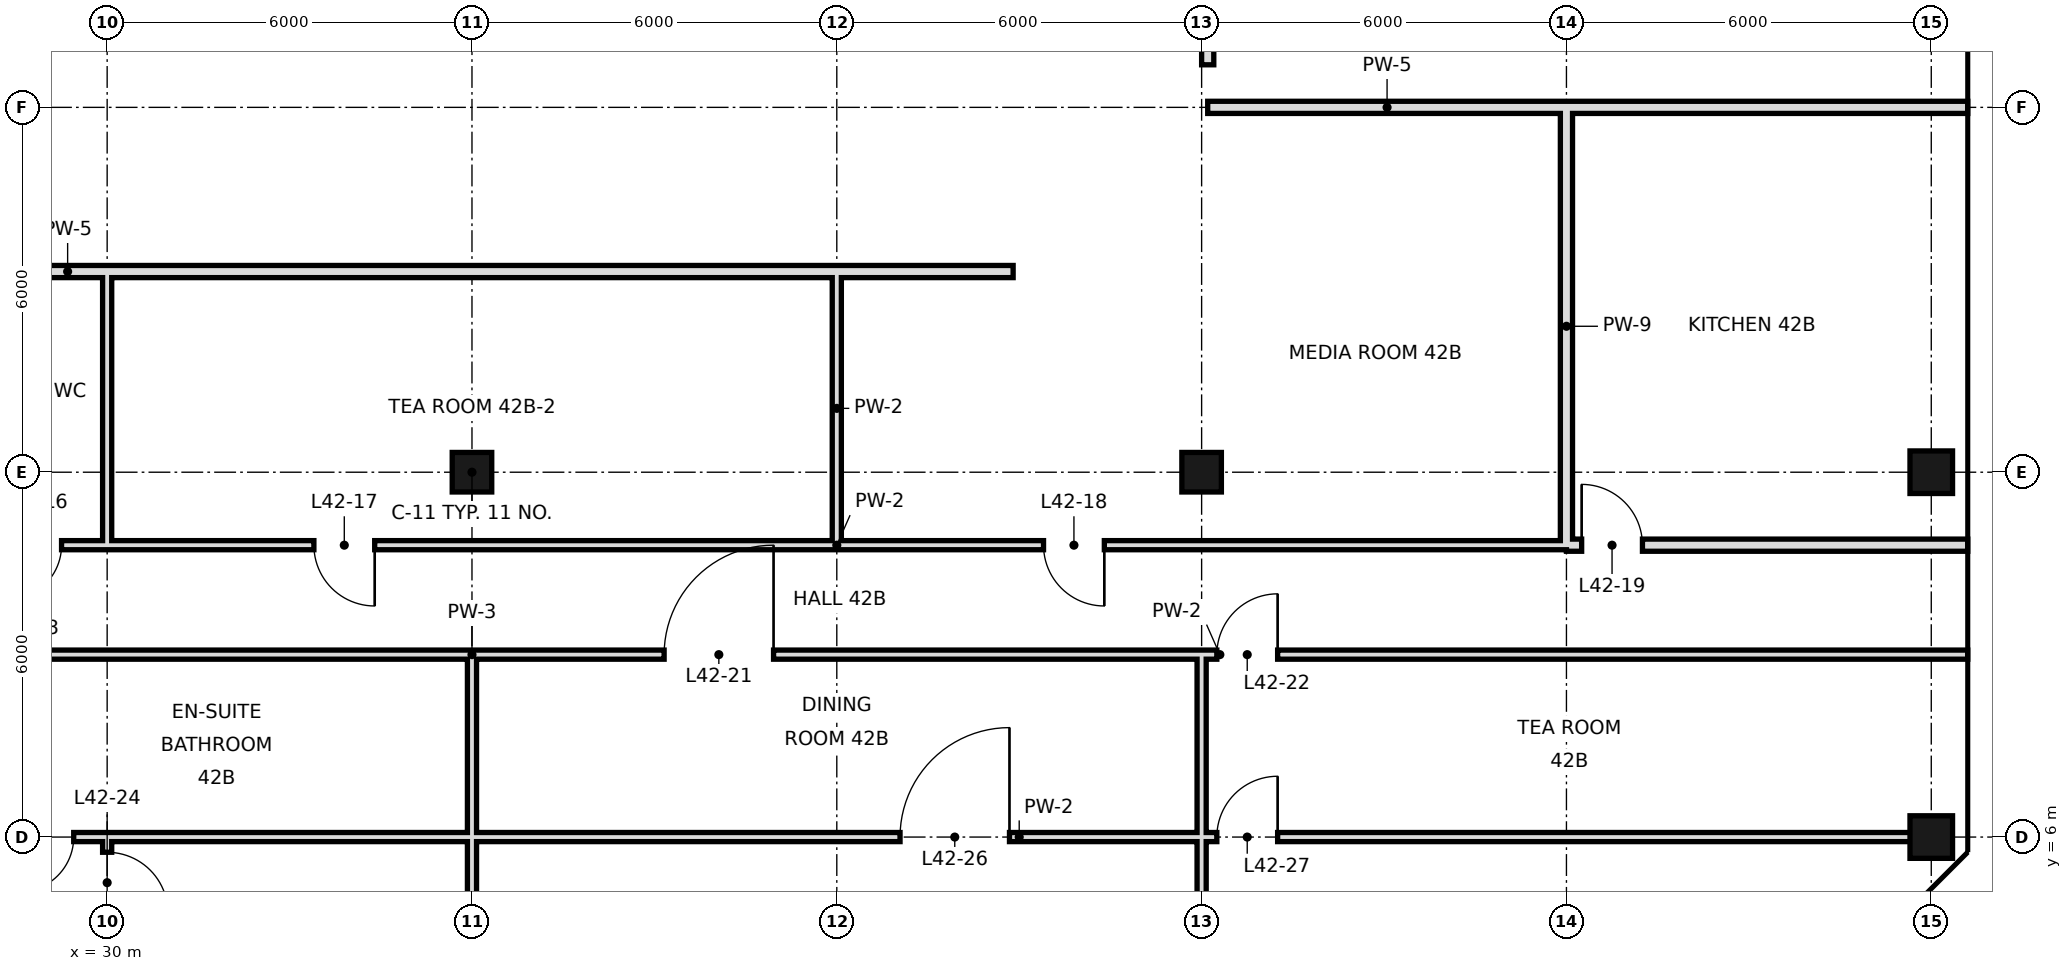
"""IFC4 building model, lengths in metres.
Left out: names, types, materials, properties, quantities, classifications, styles, units other than length and angle.
Written with IfcOpenShell. Run it as: python <this file> out.ifc"""

import sys

from ifc_helpers import new_model, si_unit, direction, frame, frame_2d, origin, origin_2d, place, context, subcontext, project, spatial, rectangle, hollow_rectangle, extrude, element, fill, save


model = new_model("IFC4")
c1 = context("Model", 3, precision=1e-05, world=origin(), true_north=direction((0.0, 1.0)))
c2 = subcontext(c1, "Body", "Model", "MODEL_VIEW")
j1 = project(units=[si_unit("LENGTHUNIT", "METRE"), si_unit("PLANEANGLEUNIT", "RADIAN")], contexts=[c1])
p1 = place(None, origin())
s1 = spatial("IfcSite", under=j1, at=p1, CompositionType="ELEMENT")
p2 = place(p1, origin())
s2 = spatial("IfcBuilding", under=s1, at=p2, CompositionType="ELEMENT")
p3 = place(p2, frame((0.0, 0.0, 181.6)))
s3 = spatial("IfcBuildingStorey", under=s2, at=p3, CompositionType="ELEMENT", Elevation=181.6)
for number, where, z_axis, x_axis in (
    (1, (36.0, 12.0, 0.0), (0.0, 0.0, 1.0), (1.0, 0.0, 0.0)),
    (2, (48.0, 12.0, 0.0), (0.0, 0.0, 1.0), (1.0, 0.0, 0.0)),
):
    element("IfcColumn", number, at=place(p3, frame(where, z_axis=z_axis, x_axis=x_axis)), inside=s3, PredefinedType="COLUMN", context=c2, shape_type="SweptSolid", body=[
        extrude(hollow_rectangle(XDim=0.65, YDim=0.65, WallThickness=0.032, at=origin_2d()), origin(), (0.0, 0.0, 1.0), 4.4),
    ])
for number, where, z_axis, x_axis in (
    (3, (60.0, 6.0, 0.0), (0.0, 0.0, 1.0), (1.0, 0.0, 0.0)),
    (4, (60.0, 12.0, 0.0), (0.0, 0.0, 1.0), (1.0, 0.0, 0.0)),
):
    element("IfcColumn", number, at=place(p3, frame(where, z_axis=z_axis, x_axis=x_axis)), inside=s3, PredefinedType="COLUMN", context=c2, shape_type="SweptSolid", body=[
        extrude(hollow_rectangle(XDim=0.7, YDim=0.7, WallThickness=0.036, at=origin_2d()), origin(), (0.0, 0.0, 1.0), 4.4),
    ])
p4 = place(p3, frame((30.0, -0.6, 0.0), z_axis=(0.0, 0.0, 1.0), x_axis=(0.0, 1.0, 0.0)))
e5 = element("IfcWall", 5, at=p4, inside=s3, PredefinedType="PARTITIONING", context=c2, shape_type="SweptSolid", body=[
    extrude(rectangle(XDim=6.6, YDim=0.15, at=frame_2d((3.3, 0.0))), origin(), (0.0, 0.0, 1.0), 3.4),
])
p5 = place(p4, frame((5.35, 0.0, 0.0)))
e6 = element("IfcOpeningElement", 6, at=p5, cuts=e5, PredefinedType="OPENING", context=c2, shape_type="SweptSolid", body=[
    extrude(rectangle(XDim=1.0, YDim=2.4, at=frame_2d((0.5, 1.2))), frame((0.0, 0.085, 0.0), z_axis=(0.0, -1.0, 0.0), x_axis=(1.0, 0.0, 0.0)), (0.0, 0.0, 1.0), 0.17),
])
p6 = place(p3, frame((30.0, 10.8, 0.0), z_axis=(0.0, 0.0, 1.0), x_axis=(0.0, 1.0, 0.0)))
e7 = element("IfcWall", 7, at=p6, inside=s3, PredefinedType="PARTITIONING", context=c2, shape_type="SweptSolid", body=[
    extrude(rectangle(XDim=4.5, YDim=0.15, at=frame_2d((2.25, 0.0))), origin(), (0.0, 0.0, 1.0), 3.4),
])
p7 = place(p3, frame((36.0, 0.0, 0.0), z_axis=(0.0, 0.0, 1.0), x_axis=(0.0, 1.0, 0.0)))
e8 = element("IfcWall", 8, at=p7, inside=s3, PredefinedType="PARTITIONING", context=c2, shape_type="SweptSolid", body=[
    extrude(rectangle(XDim=6.0, YDim=0.15, at=frame_2d((3.0, 0.0))), origin(), (0.0, 0.0, 1.0), 3.4),
])
p8 = place(p3, frame((36.0, 6.0, 0.0), z_axis=(0.0, 0.0, 1.0), x_axis=(0.0, 1.0, 0.0)))
e9 = element("IfcWall", 9, at=p8, inside=s3, PredefinedType="PARTITIONING", context=c2, shape_type="SweptSolid", body=[
    extrude(rectangle(XDim=3.0, YDim=0.15, at=frame_2d((1.5, 0.0))), origin(), (0.0, 0.0, 1.0), 3.4),
])
p9 = place(p3, frame((42.0, 10.8, 0.0), z_axis=(0.0, 0.0, 1.0), x_axis=(0.0, 1.0, 0.0)))
e10 = element("IfcWall", 10, at=p9, inside=s3, PredefinedType="PARTITIONING", context=c2, shape_type="SweptSolid", body=[
    extrude(rectangle(XDim=4.5, YDim=0.15, at=frame_2d((2.25, 0.0))), origin(), (0.0, 0.0, 1.0), 3.4),
])
p10 = place(p3, frame((48.0, 0.0, 0.0), z_axis=(0.0, 0.0, 1.0), x_axis=(0.0, 1.0, 0.0)))
e11 = element("IfcWall", 11, at=p10, inside=s3, PredefinedType="PARTITIONING", context=c2, shape_type="SweptSolid", body=[
    extrude(rectangle(XDim=9.0, YDim=0.15, at=frame_2d((4.5, 0.0))), origin(), (0.0, 0.0, 1.0), 3.4),
])
p11 = place(p3, frame((48.1, 18.7, 0.0), z_axis=(0.0, 0.0, 1.0), x_axis=(0.0, 1.0, 0.0)))
e12 = element("IfcWall", 12, at=p11, inside=s3, PredefinedType="SOLIDWALL", context=c2, shape_type="SweptSolid", body=[
    extrude(rectangle(XDim=29.3, YDim=0.2, at=frame_2d((14.65, 0.0))), origin(), (0.0, 0.0, 1.0), 3.4),
])
p12 = place(p11, frame((14.05, 0.0, 0.0)))
e13 = element("IfcOpeningElement", 13, at=p12, cuts=e12, PredefinedType="OPENING", context=c2, shape_type="SweptSolid", body=[
    extrude(rectangle(XDim=1.2, YDim=2.4, at=frame_2d((0.6, 1.2))), frame((0.0, 0.11, 0.0), z_axis=(0.0, -1.0, 0.0), x_axis=(1.0, 0.0, 0.0)), (0.0, 0.0, 1.0), 0.22),
])
p13 = place(p3, frame((54.0, 10.8, 0.0), z_axis=(0.0, 0.0, 1.0), x_axis=(0.0, 1.0, 0.0)))
e14 = element("IfcWall", 14, at=p13, inside=s3, PredefinedType="SOLIDWALL", context=c2, shape_type="SweptSolid", body=[
    extrude(rectangle(XDim=7.2, YDim=0.2, at=frame_2d((3.6, 0.0))), origin(), (0.0, 0.0, 1.0), 3.4),
])
p14 = place(p3, frame((54.0, 10.8, 0.0), z_axis=(0.0, 0.0, 1.0), x_axis=(1.0, 0.0, 0.0)))
e15 = element("IfcWall", 15, at=p14, inside=s3, PredefinedType="SOLIDWALL", context=c2, shape_type="SweptSolid", body=[
    extrude(rectangle(XDim=6.6, YDim=0.2, at=frame_2d((3.3, 0.0))), origin(), (0.0, 0.0, 1.0), 3.65),
])
p15 = place(p14, frame((0.25, 0.0, 0.0)))
e16 = element("IfcOpeningElement", 16, at=p15, cuts=e15, PredefinedType="OPENING", context=c2, shape_type="SweptSolid", body=[
    extrude(rectangle(XDim=1.0, YDim=2.4, at=frame_2d((0.5, 1.2))), frame((0.0, 0.11, 0.0), z_axis=(0.0, -1.0, 0.0), x_axis=(1.0, 0.0, 0.0)), (0.0, 0.0, 1.0), 0.22),
])
p16 = place(p3, frame((30.0, 10.8, 0.0), z_axis=(0.0, 0.0, 1.0), x_axis=(1.0, 0.0, 0.0)))
e17 = element("IfcWall", 17, at=p16, inside=s3, PredefinedType="PARTITIONING", context=c2, shape_type="SweptSolid", body=[
    extrude(rectangle(XDim=24.0, YDim=0.15, at=frame_2d((12.0, 0.0))), origin(), (0.0, 0.0, 1.0), 4.1),
])
p17 = place(p16, frame((3.4, 0.0, 0.0)))
e18 = element("IfcOpeningElement", 18, at=p17, cuts=e17, PredefinedType="OPENING", context=c2, shape_type="SweptSolid", body=[
    extrude(rectangle(XDim=1.0, YDim=2.4, at=frame_2d((0.5, 1.2))), frame((0.0, 0.085, 0.0), z_axis=(0.0, -1.0, 0.0), x_axis=(1.0, 0.0, 0.0)), (0.0, 0.0, 1.0), 0.17),
])
p18 = place(p16, frame((15.4, 0.0, 0.0)))
e19 = element("IfcOpeningElement", 19, at=p18, cuts=e17, PredefinedType="OPENING", context=c2, shape_type="SweptSolid", body=[
    extrude(rectangle(XDim=1.0, YDim=2.4, at=frame_2d((0.5, 1.2))), frame((0.0, 0.085, 0.0), z_axis=(0.0, -1.0, 0.0), x_axis=(1.0, 0.0, 0.0)), (0.0, 0.0, 1.0), 0.17),
])
p19 = place(p3, frame((27.6, 10.8, 0.0), z_axis=(0.0, 0.0, 1.0), x_axis=(1.0, 0.0, 0.0)))
e20 = element("IfcWall", 20, at=p19, inside=s3, PredefinedType="PARTITIONING", context=c2, shape_type="SweptSolid", body=[
    extrude(rectangle(XDim=2.4, YDim=0.15, at=frame_2d((1.2, 0.0))), origin(), (0.0, 0.0, 1.0), 4.1),
])
p20 = place(p19, frame((0.75, 0.0, 0.0)))
e21 = element("IfcOpeningElement", 21, at=p20, cuts=e20, PredefinedType="OPENING", context=c2, shape_type="SweptSolid", body=[
    extrude(rectangle(XDim=0.9, YDim=2.4, at=frame_2d((0.45, 1.2))), frame((0.0, 0.085, 0.0), z_axis=(0.0, -1.0, 0.0), x_axis=(1.0, 0.0, 0.0)), (0.0, 0.0, 1.0), 0.17),
])
p21 = place(p3, frame((13.8, 15.3, 0.0), z_axis=(0.0, 0.0, 1.0), x_axis=(1.0, 0.0, 0.0)))
e22 = element("IfcWall", 22, at=p21, inside=s3, PredefinedType="SOLIDWALL", context=c2, shape_type="SweptSolid", body=[
    extrude(rectangle(XDim=31.1, YDim=0.2, at=frame_2d((15.55, 0.0))), origin(), (0.0, 0.0, 1.0), 3.4),
])
p22 = place(p21, frame((11.02, 0.0, 0.0)))
e23 = element("IfcOpeningElement", 23, at=p22, cuts=e22, PredefinedType="OPENING", context=c2, shape_type="SweptSolid", body=[
    extrude(rectangle(XDim=1.2, YDim=2.4, at=frame_2d((0.6, 1.2))), frame((0.0, 0.11, 0.0), z_axis=(0.0, -1.0, 0.0), x_axis=(1.0, 0.0, 0.0)), (0.0, 0.0, 1.0), 0.22),
])
p23 = place(p3, frame((48.1, 18.0, 0.0), z_axis=(0.0, 0.0, 1.0), x_axis=(1.0, 0.0, 0.0)))
e24 = element("IfcWall", 24, at=p23, inside=s3, PredefinedType="SOLIDWALL", context=c2, shape_type="SweptSolid", body=[
    extrude(rectangle(XDim=5.9, YDim=0.2, at=frame_2d((2.95, 0.0))), origin(), (0.0, 0.0, 1.0), 3.4),
])
p24 = place(p3, frame((54.0, 18.0, 0.0), z_axis=(0.0, 0.0, 1.0), x_axis=(1.0, 0.0, 0.0)))
e25 = element("IfcWall", 25, at=p24, inside=s3, PredefinedType="SOLIDWALL", context=c2, shape_type="SweptSolid", body=[
    extrude(rectangle(XDim=6.6, YDim=0.2, at=frame_2d((3.3, 0.0))), origin(), (0.0, 0.0, 1.0), 3.4),
])
p25 = place(p3, frame((36.0, 6.0, 0.0), z_axis=(0.0, 0.0, 1.0), x_axis=(1.0, 0.0, 0.0)))
e26 = element("IfcWall", 26, at=p25, inside=s3, PredefinedType="PARTITIONING", context=c2, shape_type="SweptSolid", body=[
    extrude(rectangle(XDim=24.0, YDim=0.15, at=frame_2d((12.0, 0.0))), origin(), (0.0, 0.0, 1.0), 3.4),
])
p26 = place(p25, frame((7.04, 0.0, 0.0)))
e27 = element("IfcOpeningElement", 27, at=p26, cuts=e26, PredefinedType="OPENING", context=c2, shape_type="SweptSolid", body=[
    extrude(rectangle(XDim=1.8, YDim=2.4, at=frame_2d((0.9, 1.2))), frame((0.0, 0.085, 0.0), z_axis=(0.0, -1.0, 0.0), x_axis=(1.0, 0.0, 0.0)), (0.0, 0.0, 1.0), 0.17),
])
p27 = place(p25, frame((12.25, 0.0, 0.0)))
e28 = element("IfcOpeningElement", 28, at=p27, cuts=e26, PredefinedType="OPENING", context=c2, shape_type="SweptSolid", body=[
    extrude(rectangle(XDim=1.0, YDim=2.4, at=frame_2d((0.5, 1.2))), frame((0.0, 0.085, 0.0), z_axis=(0.0, -1.0, 0.0), x_axis=(1.0, 0.0, 0.0)), (0.0, 0.0, 1.0), 0.17),
])
p28 = place(p3, frame((27.6, 6.0, 0.0), z_axis=(0.0, 0.0, 1.0), x_axis=(1.0, 0.0, 0.0)))
e29 = element("IfcWall", 29, at=p28, inside=s3, PredefinedType="PARTITIONING", context=c2, shape_type="SweptSolid", body=[
    extrude(rectangle(XDim=8.4, YDim=0.15, at=frame_2d((4.2, 0.0))), origin(), (0.0, 0.0, 1.0), 3.65),
])
p29 = place(p28, frame((0.95, 0.0, 0.0)))
e30 = element("IfcOpeningElement", 30, at=p29, cuts=e29, PredefinedType="OPENING", context=c2, shape_type="SweptSolid", body=[
    extrude(rectangle(XDim=0.9, YDim=2.4, at=frame_2d((0.45, 1.2))), frame((0.0, 0.085, 0.0), z_axis=(0.0, -1.0, 0.0), x_axis=(1.0, 0.0, 0.0)), (0.0, 0.0, 1.0), 0.17),
])
p30 = place(p3, frame((36.0, 9.0, 0.0), z_axis=(0.0, 0.0, 1.0), x_axis=(1.0, 0.0, 0.0)))
e31 = element("IfcWall", 31, at=p30, inside=s3, PredefinedType="PARTITIONING", context=c2, shape_type="SweptSolid", body=[
    extrude(rectangle(XDim=24.6, YDim=0.15, at=frame_2d((12.3, 0.0))), origin(), (0.0, 0.0, 1.0), 4.1),
])
p31 = place(p30, frame((3.16, 0.0, 0.0)))
e32 = element("IfcOpeningElement", 32, at=p31, cuts=e31, PredefinedType="OPENING", context=c2, shape_type="SweptSolid", body=[
    extrude(rectangle(XDim=1.8, YDim=2.4, at=frame_2d((0.9, 1.2))), frame((0.0, 0.085, 0.0), z_axis=(0.0, -1.0, 0.0), x_axis=(1.0, 0.0, 0.0)), (0.0, 0.0, 1.0), 0.17),
])
p32 = place(p30, frame((12.25, 0.0, 0.0)))
e33 = element("IfcOpeningElement", 33, at=p32, cuts=e31, PredefinedType="OPENING", context=c2, shape_type="SweptSolid", body=[
    extrude(rectangle(XDim=1.0, YDim=2.4, at=frame_2d((0.5, 1.2))), frame((0.0, 0.085, 0.0), z_axis=(0.0, -1.0, 0.0), x_axis=(1.0, 0.0, 0.0)), (0.0, 0.0, 1.0), 0.17),
])
p33 = place(p3, frame((27.6, 9.0, 0.0), z_axis=(0.0, 0.0, 1.0), x_axis=(1.0, 0.0, 0.0)))
e34 = element("IfcWall", 34, at=p33, inside=s3, PredefinedType="PARTITIONING", context=c2, shape_type="SweptSolid", body=[
    extrude(rectangle(XDim=8.4, YDim=0.15, at=frame_2d((4.2, 0.0))), origin(), (0.0, 0.0, 1.0), 4.1),
])
p34 = place(p20, frame((0.9, 0.0, 0.0), z_axis=(0.0, 0.0, 1.0), x_axis=(-1.0, 0.0, 0.0)))
e35 = element("IfcDoor", 35, at=p34, inside=s3, OperationType="SINGLE_SWING_RIGHT", PredefinedType="DOOR", context=c2, shape_type="SweptSolid", body=[
    extrude(rectangle(XDim=0.9, YDim=2.4, at=frame_2d((0.45, 1.2))), frame((0.0, 0.025, 0.0), z_axis=(0.0, -1.0, 0.0), x_axis=(1.0, 0.0, 0.0)), (0.0, 0.0, 1.0), 0.05),
])
fill(e21, e35)
p35 = place(p17, origin())
e36 = element("IfcDoor", 36, at=p35, inside=s3, OperationType="SINGLE_SWING_RIGHT", PredefinedType="DOOR", context=c2, shape_type="SweptSolid", body=[
    extrude(rectangle(XDim=1.0, YDim=2.4, at=frame_2d((0.5, 1.2))), frame((0.0, 0.025, 0.0), z_axis=(0.0, -1.0, 0.0), x_axis=(1.0, 0.0, 0.0)), (0.0, 0.0, 1.0), 0.05),
])
fill(e18, e36)
p36 = place(p18, origin())
e37 = element("IfcDoor", 37, at=p36, inside=s3, OperationType="SINGLE_SWING_RIGHT", PredefinedType="DOOR", context=c2, shape_type="SweptSolid", body=[
    extrude(rectangle(XDim=1.0, YDim=2.4, at=frame_2d((0.5, 1.2))), frame((0.0, 0.025, 0.0), z_axis=(0.0, -1.0, 0.0), x_axis=(1.0, 0.0, 0.0)), (0.0, 0.0, 1.0), 0.05),
])
fill(e19, e37)
p37 = place(p15, origin())
e38 = element("IfcDoor", 38, at=p37, inside=s3, OperationType="SINGLE_SWING_LEFT", PredefinedType="DOOR", context=c2, shape_type="SweptSolid", body=[
    extrude(rectangle(XDim=1.0, YDim=2.4, at=frame_2d((0.5, 1.2))), frame((0.0, 0.025, 0.0), z_axis=(0.0, -1.0, 0.0), x_axis=(1.0, 0.0, 0.0)), (0.0, 0.0, 1.0), 0.05),
])
fill(e16, e38)
p38 = place(p31, frame((1.8, 0.0, 0.0), z_axis=(0.0, 0.0, 1.0), x_axis=(-1.0, 0.0, 0.0)))
e39 = element("IfcDoor", 39, at=p38, inside=s3, OperationType="SINGLE_SWING_LEFT", PredefinedType="DOOR", context=c2, shape_type="SweptSolid", body=[
    extrude(rectangle(XDim=1.8, YDim=2.4, at=frame_2d((0.9, 1.2))), frame((0.0, 0.025, 0.0), z_axis=(0.0, -1.0, 0.0), x_axis=(1.0, 0.0, 0.0)), (0.0, 0.0, 1.0), 0.05),
])
fill(e32, e39)
p39 = place(p32, frame((1.0, 0.0, 0.0), z_axis=(0.0, 0.0, 1.0), x_axis=(-1.0, 0.0, 0.0)))
e40 = element("IfcDoor", 40, at=p39, inside=s3, OperationType="SINGLE_SWING_LEFT", PredefinedType="DOOR", context=c2, shape_type="SweptSolid", body=[
    extrude(rectangle(XDim=1.0, YDim=2.4, at=frame_2d((0.5, 1.2))), frame((0.0, 0.025, 0.0), z_axis=(0.0, -1.0, 0.0), x_axis=(1.0, 0.0, 0.0)), (0.0, 0.0, 1.0), 0.05),
])
fill(e33, e40)
p40 = place(p5, frame((1.0, 0.0, 0.0), z_axis=(0.0, 0.0, 1.0), x_axis=(-1.0, 0.0, 0.0)))
e41 = element("IfcDoor", 41, at=p40, inside=s3, OperationType="SINGLE_SWING_RIGHT", PredefinedType="DOOR", context=c2, shape_type="SweptSolid", body=[
    extrude(rectangle(XDim=1.0, YDim=2.4, at=frame_2d((0.5, 1.2))), frame((0.0, 0.025, 0.0), z_axis=(0.0, -1.0, 0.0), x_axis=(1.0, 0.0, 0.0)), (0.0, 0.0, 1.0), 0.05),
])
fill(e6, e41)
p41 = place(p29, frame((0.9, 0.0, 0.0), z_axis=(0.0, 0.0, 1.0), x_axis=(-1.0, 0.0, 0.0)))
e42 = element("IfcDoor", 42, at=p41, inside=s3, OperationType="SINGLE_SWING_RIGHT", PredefinedType="DOOR", context=c2, shape_type="SweptSolid", body=[
    extrude(rectangle(XDim=0.9, YDim=2.4, at=frame_2d((0.45, 1.2))), frame((0.0, 0.025, 0.0), z_axis=(0.0, -1.0, 0.0), x_axis=(1.0, 0.0, 0.0)), (0.0, 0.0, 1.0), 0.05),
])
fill(e30, e42)
p42 = place(p26, frame((1.8, 0.0, 0.0), z_axis=(0.0, 0.0, 1.0), x_axis=(-1.0, 0.0, 0.0)))
e43 = element("IfcDoor", 43, at=p42, inside=s3, OperationType="SINGLE_SWING_LEFT", PredefinedType="DOOR", context=c2, shape_type="SweptSolid", body=[
    extrude(rectangle(XDim=1.8, YDim=2.4, at=frame_2d((0.9, 1.2))), frame((0.0, 0.025, 0.0), z_axis=(0.0, -1.0, 0.0), x_axis=(1.0, 0.0, 0.0)), (0.0, 0.0, 1.0), 0.05),
])
fill(e27, e43)
p43 = place(p27, frame((1.0, 0.0, 0.0), z_axis=(0.0, 0.0, 1.0), x_axis=(-1.0, 0.0, 0.0)))
e44 = element("IfcDoor", 44, at=p43, inside=s3, OperationType="SINGLE_SWING_LEFT", PredefinedType="DOOR", context=c2, shape_type="SweptSolid", body=[
    extrude(rectangle(XDim=1.0, YDim=2.4, at=frame_2d((0.5, 1.2))), frame((0.0, 0.025, 0.0), z_axis=(0.0, -1.0, 0.0), x_axis=(1.0, 0.0, 0.0)), (0.0, 0.0, 1.0), 0.05),
])
fill(e28, e44)
save(model, sys.argv[1])
